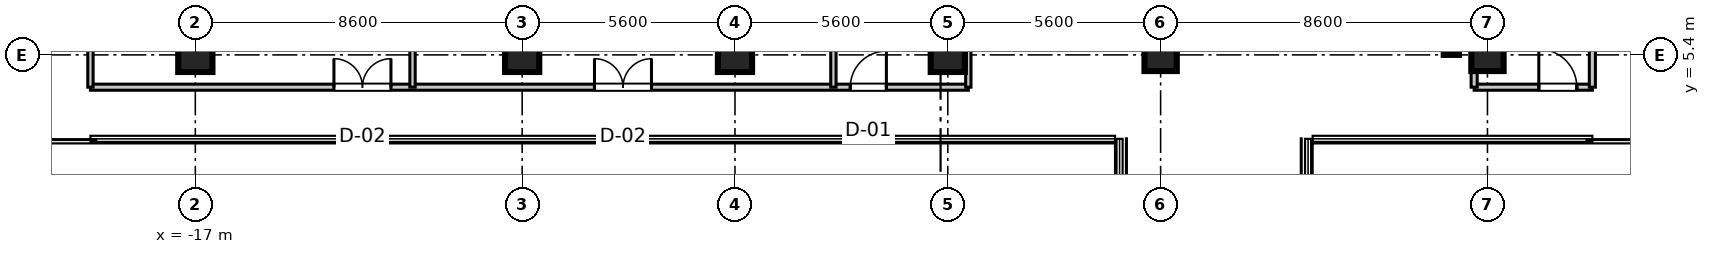
"""IFC4 building model, lengths in metres.
Left out: names, types, materials, properties, quantities, classifications, styles, units other than length and angle.
Written with IfcOpenShell. Run it as: python <this file> out.ifc"""

import sys

from ifc_helpers import new_model, si_unit, direction, frame, frame_2d, origin, origin_2d, place, context, subcontext, project, spatial, rectangle, extrude, source, transform, mapped, element, fill, save


model = new_model("IFC4")
c1 = context("Model", 3, precision=1e-05, world=origin(), true_north=direction((0.0, 1.0)))
c2 = subcontext(c1, "Body", "Model", "MODEL_VIEW")
j1 = project(units=[si_unit("LENGTHUNIT", "METRE"), si_unit("PLANEANGLEUNIT", "RADIAN")], contexts=[c1])
p1 = place(None, origin())
s1 = spatial("IfcSite", under=j1, at=p1, CompositionType="ELEMENT")
p2 = place(p1, origin())
s2 = spatial("IfcBuilding", under=s1, at=p2, CompositionType="ELEMENT")
p3 = place(p2, frame((0.0, 0.0, 288.8)))
s3 = spatial("IfcBuildingStorey", under=s2, at=p3, CompositionType="ELEMENT", Elevation=288.8)
m1 = source(origin(), c2, "Body", "SweptSolid", [
    extrude(rectangle(XDim=0.9, YDim=0.9, at=origin_2d()), origin(), (0.0, 0.0, 1.0), 3.805),
])
for number, where, z_axis, x_axis in (
    (1, (-17.0, 5.4, 0.0), (0.0, 0.0, 1.0), (1.0, 0.0, 0.0)),
    (2, (-8.4, 5.4, 0.0), (0.0, 0.0, 1.0), (1.0, 0.0, 0.0)),
    (3, (-2.8, 5.4, 0.0), (0.0, 0.0, 1.0), (1.0, 0.0, 0.0)),
    (4, (2.8, 5.4, 0.0), (0.0, 0.0, 1.0), (1.0, 0.0, 0.0)),
):
    element("IfcColumn", number, at=place(p3, frame(where, z_axis=z_axis, x_axis=x_axis)), inside=s3, PredefinedType="COLUMN", context=c2, shape_type="MappedRepresentation", body=[
        mapped(m1, transform((0.0, 0.0, 0.0), scale=1.0)),
    ])
m2 = source(origin(), c2, "Body", "SweptSolid", [
    extrude(rectangle(XDim=0.85, YDim=0.85, at=origin_2d()), origin(), (0.0, 0.0, 1.0), 3.805),
])
for number, where, z_axis, x_axis in (
    (5, (8.4, 5.4, 0.0), (0.0, 0.0, 1.0), (1.0, 0.0, 0.0)),
    (6, (17.0, 5.4, 0.0), (0.0, 0.0, 1.0), (1.0, 0.0, 0.0)),
):
    element("IfcColumn", number, at=place(p3, frame(where, z_axis=z_axis, x_axis=x_axis)), inside=s3, PredefinedType="PILASTER", context=c2, shape_type="MappedRepresentation", body=[
        mapped(m2, transform((0.0, 0.0, 0.0), scale=1.0)),
    ])
m3 = source(origin(), c2, "Body", "SweptSolid", [
    extrude(rectangle(XDim=11.6, YDim=0.4, at=frame_2d((5.8, 0.0))), origin(), (0.0, 0.0, 1.0), 3.55),
])
p4 = place(p3, frame((16.05, 5.4, 0.0), z_axis=(0.0, 0.0, 1.0), x_axis=(0.0, 1.0, 0.0)))
e7 = element("IfcWall", 7, at=p4, inside=s3, PredefinedType="SHEAR", context=c2, shape_type="MappedRepresentation", body=[
    mapped(m3, transform((0.0, 0.0, 0.0), scale=1.0)),
])
m4 = source(origin(), c2, "Body", "SweptSolid", [
    extrude(rectangle(XDim=3.11, YDim=0.16, at=frame_2d((1.555, 0.0))), origin(), (0.0, 0.0, 1.0), 2.89),
])
p5 = place(p3, frame((16.65, 4.55, 0.0), z_axis=(0.0, 0.0, 1.0), x_axis=(1.0, 0.0, 0.0)))
e8 = element("IfcWall", 8, at=p5, inside=s3, PredefinedType="PARTITIONING", context=c2, shape_type="MappedRepresentation", body=[
    mapped(m4, transform((0.0, 0.0, 0.0), scale=1.0)),
])
p6 = place(p5, frame((1.701, 0.0, 0.0)))
e9 = element("IfcOpeningElement", 9, at=p6, cuts=e8, PredefinedType="OPENING", context=c2, shape_type="SweptSolid", body=[
    extrude(rectangle(XDim=1.0, YDim=2.1, at=frame_2d((0.5, 1.05))), frame((0.0, 0.09, 0.0), z_axis=(0.0, -1.0, 0.0), x_axis=(1.0, 0.0, 0.0)), (0.0, 0.0, 1.0), 0.18),
])
m5 = source(origin(), c2, "Body", "SweptSolid", [
    extrude(rectangle(XDim=17.95, YDim=0.16, at=frame_2d((8.975, 0.0))), origin(), (0.0, 0.0, 1.0), 2.89),
])
p7 = place(p3, frame((16.65, 4.55, 0.0), z_axis=(0.0, 0.0, 1.0), x_axis=(0.0, 1.0, 0.0)))
e10 = element("IfcWall", 10, at=p7, inside=s3, PredefinedType="PARTITIONING", context=c2, shape_type="MappedRepresentation", body=[
    mapped(m5, transform((0.0, 0.0, 0.0), scale=1.0)),
])
m6 = source(origin(), c2, "Body", "SweptSolid", [
    extrude(rectangle(XDim=16.53, YDim=0.16, at=frame_2d((8.265, 0.0))), origin(), (0.0, 0.0, 1.0), 2.89),
])
p8 = place(p3, frame((19.76, 4.55, 0.0), z_axis=(0.0, 0.0, 1.0), x_axis=(0.0, 1.0, 0.0)))
e11 = element("IfcWall", 11, at=p8, inside=s3, PredefinedType="PARTITIONING", context=c2, shape_type="MappedRepresentation", body=[
    mapped(m6, transform((0.0, 0.0, 0.0), scale=1.0)),
])
m7 = source(origin(), c2, "Body", "SweptSolid", [
    extrude(rectangle(XDim=23.1, YDim=0.16, at=frame_2d((11.55, 0.0))), origin(), (0.0, 0.0, 1.0), 2.89),
])
p9 = place(p3, frame((-19.76, 4.55, 0.0), z_axis=(0.0, 0.0, 1.0), x_axis=(1.0, 0.0, 0.0)))
e12 = element("IfcWall", 12, at=p9, inside=s3, PredefinedType="PARTITIONING", context=c2, shape_type="MappedRepresentation", body=[
    mapped(m7, transform((0.0, 0.0, 0.0), scale=1.0)),
])
p10 = place(p9, frame((6.407, 0.0, 0.0)))
e13 = element("IfcOpeningElement", 13, at=p10, cuts=e12, PredefinedType="OPENING", context=c2, shape_type="SweptSolid", body=[
    extrude(rectangle(XDim=1.5, YDim=2.15, at=frame_2d((0.75, 1.075))), frame((0.0, 0.09, 0.0), z_axis=(0.0, -1.0, 0.0), x_axis=(1.0, 0.0, 0.0)), (0.0, 0.0, 1.0), 0.18),
])
p11 = place(p9, frame((13.263, 0.0, 0.0)))
e14 = element("IfcOpeningElement", 14, at=p11, cuts=e12, PredefinedType="OPENING", context=c2, shape_type="SweptSolid", body=[
    extrude(rectangle(XDim=1.5, YDim=2.15, at=frame_2d((0.75, 1.075))), frame((0.0, 0.09, 0.0), z_axis=(0.0, -1.0, 0.0), x_axis=(1.0, 0.0, 0.0)), (0.0, 0.0, 1.0), 0.18),
])
p12 = place(p9, frame((19.994, 0.0, 0.0)))
e15 = element("IfcOpeningElement", 15, at=p12, cuts=e12, PredefinedType="OPENING", context=c2, shape_type="SweptSolid", body=[
    extrude(rectangle(XDim=0.95, YDim=2.1, at=frame_2d((0.475, 1.05))), frame((0.0, 0.09, 0.0), z_axis=(0.0, -1.0, 0.0), x_axis=(1.0, 0.0, 0.0)), (0.0, 0.0, 1.0), 0.18),
])
m8 = source(origin(), c2, "Body", "SweptSolid", [
    extrude(rectangle(XDim=16.53, YDim=0.14, at=frame_2d((8.265, 0.0))), origin(), (0.0, 0.0, 1.0), 2.89),
])
p13 = place(p3, frame((-19.76, 4.55, 0.0), z_axis=(0.0, 0.0, 1.0), x_axis=(0.0, 1.0, 0.0)))
e16 = element("IfcWall", 16, at=p13, inside=s3, PredefinedType="PARTITIONING", context=c2, shape_type="MappedRepresentation", body=[
    mapped(m8, transform((0.0, 0.0, 0.0), scale=1.0)),
])
m9 = source(origin(), c2, "Body", "SweptSolid", [
    extrude(rectangle(XDim=17.95, YDim=0.14, at=frame_2d((8.975, 0.0))), origin(), (0.0, 0.0, 1.0), 2.89),
])
for number, where, z_axis, x_axis in (
    (17, (3.34, 4.55, 0.0), (0.0, 0.0, 1.0), (0.0, 1.0, 0.0)),
    (18, (-11.285, 4.55, 0.0), (0.0, 0.0, 1.0), (0.0, 1.0, 0.0)),
    (19, (-0.21, 4.55, 0.0), (0.0, 0.0, 1.0), (0.0, 1.0, 0.0)),
):
    element("IfcWall", number, at=place(p3, frame(where, z_axis=z_axis, x_axis=x_axis)), inside=s3, PredefinedType="PARTITIONING", context=c2, shape_type="MappedRepresentation", body=[
        mapped(m9, transform((0.0, 0.0, 0.0), scale=1.0)),
    ])
m10 = source(origin(), c2, "Body", "SweptSolid", [
    extrude(rectangle(XDim=1.0, YDim=2.1, at=frame_2d((0.5, 1.05))), frame((0.0, 0.025, 0.0), z_axis=(0.0, -1.0, 0.0), x_axis=(1.0, 0.0, 0.0)), (0.0, 0.0, 1.0), 0.05),
])
p14 = place(p6, origin())
e20 = element("IfcDoor", 20, at=p14, inside=s3, OperationType="SINGLE_SWING_LEFT", PredefinedType="DOOR", context=c2, shape_type="MappedRepresentation", body=[
    mapped(m10, transform((0.0, 0.0, 0.0), scale=1.0)),
])
fill(e9, e20)
m11 = source(origin(), c2, "Body", "SweptSolid", [
    extrude(rectangle(XDim=1.5, YDim=2.15, at=frame_2d((0.75, 1.075))), frame((0.0, 0.025, 0.0), z_axis=(0.0, -1.0, 0.0), x_axis=(1.0, 0.0, 0.0)), (0.0, 0.0, 1.0), 0.05),
])
p15 = place(p10, origin())
e21 = element("IfcDoor", 21, at=p15, inside=s3, OperationType="DOUBLE_DOOR_SINGLE_SWING", PredefinedType="DOOR", context=c2, shape_type="MappedRepresentation", body=[
    mapped(m11, transform((0.0, 0.0, 0.0), scale=1.0)),
])
fill(e13, e21)
p16 = place(p11, origin())
e22 = element("IfcDoor", 22, at=p16, inside=s3, OperationType="DOUBLE_DOOR_SINGLE_SWING", PredefinedType="DOOR", context=c2, shape_type="MappedRepresentation", body=[
    mapped(m11, transform((0.0, 0.0, 0.0), scale=1.0)),
])
fill(e14, e22)
m12 = source(origin(), c2, "Body", "SweptSolid", [
    extrude(rectangle(XDim=0.95, YDim=2.1, at=frame_2d((0.475, 1.05))), frame((0.0, 0.025, 0.0), z_axis=(0.0, -1.0, 0.0), x_axis=(1.0, 0.0, 0.0)), (0.0, 0.0, 1.0), 0.05),
])
p17 = place(p12, origin())
e23 = element("IfcDoor", 23, at=p17, inside=s3, OperationType="SINGLE_SWING_RIGHT", PredefinedType="DOOR", context=c2, shape_type="MappedRepresentation", body=[
    mapped(m12, transform((0.0, 0.0, 0.0), scale=1.0)),
])
fill(e15, e23)
save(model, sys.argv[1])
